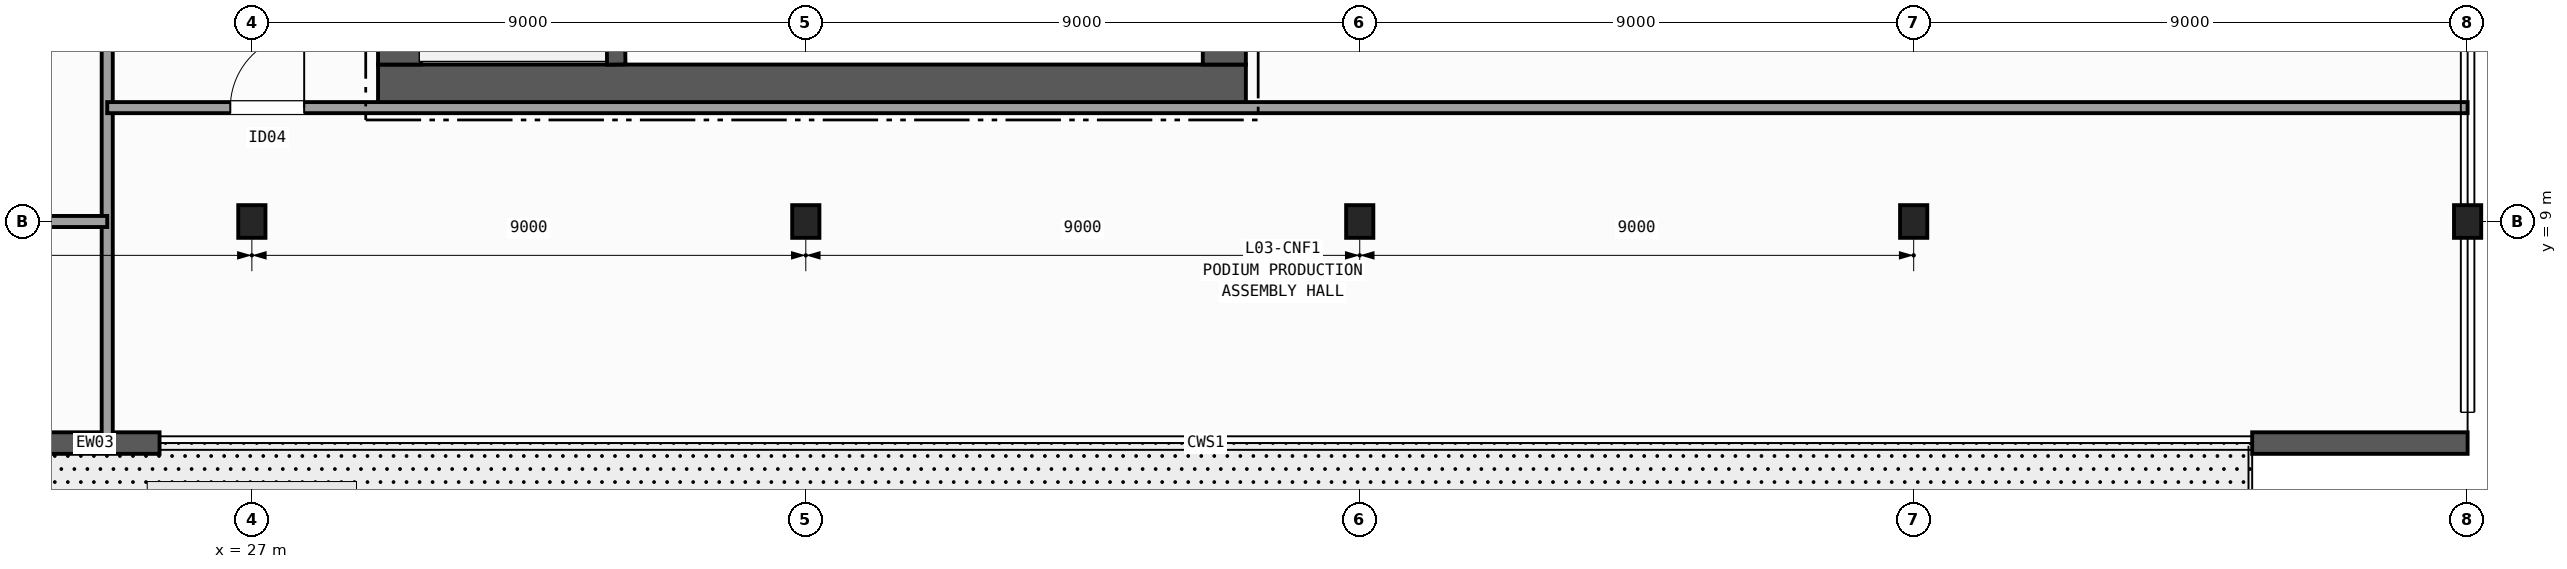
"""IFC4 building model, lengths in metres.
Left out: names, types, materials, properties, quantities, classifications, styles, units other than length and angle.
Written with IfcOpenShell. Run it as: python <this file> out.ifc"""

import sys

from ifc_helpers import new_model, si_unit, direction, frame, frame_2d, origin, origin_2d, place, context, subcontext, project, spatial, rectangle, i_section, extrude, element, fill, save


model = new_model("IFC4")
c1 = context("Model", 3, precision=1e-05, world=origin(), true_north=direction((0.0, 1.0)))
c2 = subcontext(c1, "Body", "Model", "MODEL_VIEW")
j1 = project(units=[si_unit("LENGTHUNIT", "METRE"), si_unit("PLANEANGLEUNIT", "RADIAN")], contexts=[c1])
p1 = place(None, origin())
s1 = spatial("IfcSite", under=j1, at=p1, CompositionType="ELEMENT")
p2 = place(p1, origin())
s2 = spatial("IfcBuilding", under=s1, at=p2, CompositionType="ELEMENT")
p3 = place(p2, frame((0.0, 0.0, 16.2)))
s3 = spatial("IfcBuildingStorey", under=s2, at=p3, CompositionType="ELEMENT", Elevation=16.2)
for number, where, z_axis, x_axis in (
    (1, (27.0, 9.0, 0.0), (0.0, 0.0, 1.0), (1.0, 0.0, 0.0)),
    (2, (36.0, 9.0, 0.0), (0.0, 0.0, 1.0), (1.0, 0.0, 0.0)),
    (3, (45.0, 9.0, 0.0), (0.0, 0.0, 1.0), (1.0, 0.0, 0.0)),
    (4, (54.0, 9.0, 0.0), (0.0, 0.0, 1.0), (1.0, 0.0, 0.0)),
    (5, (63.0, 9.0, 0.0), (0.0, 0.0, 1.0), (1.0, 0.0, 0.0)),
):
    element("IfcColumn", number, at=place(p3, frame(where, z_axis=z_axis, x_axis=x_axis)), inside=s3, PredefinedType="COLUMN", context=c2, shape_type="SweptSolid", body=[
        extrude(i_section(OverallWidth=0.442, OverallDepth=0.531, WebThickness=0.066, FlangeThickness=0.106, FilletRadius=0.015, at=origin_2d()), origin(), (0.0, 0.0, 1.0), 5.0),
    ])
p4 = place(p3, frame((25.5, 5.4, 0.0), z_axis=(0.0, 0.0, 1.0), x_axis=(-1.0, 0.0, 0.0)))
e6 = element("IfcWall", 6, at=p4, inside=s3, PredefinedType="SOLIDWALL", context=c2, shape_type="SweptSolid", body=[
    extrude(rectangle(XDim=5.1, YDim=0.35, at=frame_2d((2.55, 0.0))), origin(), (0.0, 0.0, 1.0), 4.68),
])
p5 = place(p4, frame((2.4, 0.0, 0.0)))
e7 = element("IfcOpeningElement", 7, at=p5, cuts=e6, PredefinedType="OPENING", context=c2, shape_type="SweptSolid", body=[
    extrude(rectangle(XDim=1.2, YDim=2.2, at=frame_2d((0.6, 1.1))), frame((0.0, 0.185, 0.0), z_axis=(0.0, -1.0, 0.0), x_axis=(1.0, 0.0, 0.0)), (0.0, 0.0, 1.0), 0.37),
])
p6 = place(p3, frame((63.0, 5.4, 0.0), z_axis=(0.0, 0.0, 1.0), x_axis=(-1.0, 0.0, 0.0)))
e8 = element("IfcWall", 8, at=p6, inside=s3, PredefinedType="SOLIDWALL", context=c2, shape_type="SweptSolid", body=[
    extrude(rectangle(XDim=3.5, YDim=0.35, at=frame_2d((1.75, 0.0))), origin(), (0.0, 0.0, 1.0), 4.68),
])
p7 = place(p3, frame((29.05, 11.2, 0.0), z_axis=(0.0, 0.0, 1.0), x_axis=(1.0, 0.0, 0.0)))
e9 = element("IfcWall", 9, at=p7, inside=s3, PredefinedType="SHEAR", context=c2, shape_type="SweptSolid", body=[
    extrude(rectangle(XDim=14.1, YDim=0.7, at=frame_2d((7.05, 0.0))), origin(), (0.0, 0.0, 1.0), 4.68),
])
p8 = place(p3, frame((29.4, 24.25, 0.0), z_axis=(0.0, 0.0, 1.0), x_axis=(0.0, -1.0, 0.0)))
e10 = element("IfcWall", 10, at=p8, inside=s3, PredefinedType="SHEAR", context=c2, shape_type="SweptSolid", body=[
    extrude(rectangle(XDim=12.7, YDim=0.7, at=frame_2d((6.35, 0.0))), origin(), (0.0, 0.0, 1.0), 4.68),
])
p9 = place(p8, frame((1.35, 0.0, 0.0)))
e11 = element("IfcOpeningElement", 11, at=p9, cuts=e10, PredefinedType="OPENING", context=c2, shape_type="SweptSolid", body=[
    extrude(rectangle(XDim=1.35, YDim=2.15, at=frame_2d((0.675, 1.075))), frame((0.0, 0.36, 0.0), z_axis=(0.0, -1.0, 0.0), x_axis=(1.0, 0.0, 0.0)), (0.0, 0.0, 1.0), 0.72),
])
p10 = place(p3, frame((42.8, 11.55, 0.0), z_axis=(0.0, 0.0, 1.0), x_axis=(0.0, 1.0, 0.0)))
e12 = element("IfcWall", 12, at=p10, inside=s3, PredefinedType="SHEAR", context=c2, shape_type="SweptSolid", body=[
    extrude(rectangle(XDim=12.7, YDim=0.7, at=frame_2d((6.35, 0.0))), origin(), (0.0, 0.0, 1.0), 4.68),
])
p11 = place(p3, frame((32.92, 11.55, 0.0), z_axis=(0.0, 0.0, 1.0), x_axis=(-0.01331804616, 0.99991131089, 0.0)))
e13 = element("IfcWall", 13, at=p11, inside=s3, PredefinedType="SHEAR", context=c2, shape_type="SweptSolid", body=[
    extrude(rectangle(XDim=9.001, YDim=0.3, at=frame_2d((4.5, 0.0))), origin(), (0.0, 0.0, 1.0), 4.68),
])
p12 = place(p3, frame((24.65, 5.4, 0.0), z_axis=(0.0, 0.0, 1.0), x_axis=(0.0, 1.0, 0.0)))
e14 = element("IfcWall", 14, at=p12, inside=s3, PredefinedType="PARTITIONING", context=c2, shape_type="SweptSolid", body=[
    extrude(rectangle(XDim=22.8, YDim=0.18, at=frame_2d((11.4, 0.0))), origin(), (0.0, 0.0, 1.0), 3.712),
])
p13 = place(p12, frame((8.6, 0.0, 0.0)))
e15 = element("IfcOpeningElement", 15, at=p13, cuts=e14, PredefinedType="OPENING", context=c2, shape_type="SweptSolid", body=[
    extrude(rectangle(XDim=1.4, YDim=2.15, at=frame_2d((0.7, 1.075))), frame((0.0, 0.1, 0.0), z_axis=(0.0, -1.0, 0.0), x_axis=(1.0, 0.0, 0.0)), (0.0, 0.0, 1.0), 0.2),
])
p14 = place(p3, frame((24.65, 10.85, 0.0), z_axis=(0.0, 0.0, 1.0), x_axis=(1.0, 0.0, 0.0)))
e16 = element("IfcWall", 16, at=p14, inside=s3, PredefinedType="PARTITIONING", context=c2, shape_type="SweptSolid", body=[
    extrude(rectangle(XDim=38.35, YDim=0.18, at=frame_2d((19.175, 0.0))), origin(), (0.0, 0.0, 1.0), 3.805),
])
p15 = place(p14, frame((2.0, 0.0, 0.0)))
e17 = element("IfcOpeningElement", 17, at=p15, cuts=e16, PredefinedType="OPENING", context=c2, shape_type="SweptSolid", body=[
    extrude(rectangle(XDim=1.2, YDim=2.15, at=frame_2d((0.6, 1.075))), frame((0.0, 0.1, 0.0), z_axis=(0.0, -1.0, 0.0), x_axis=(1.0, 0.0, 0.0)), (0.0, 0.0, 1.0), 0.2),
])
p16 = place(p3, frame((5.4, 9.0, 0.0), z_axis=(0.0, 0.0, 1.0), x_axis=(1.0, 0.0, 0.0)))
e18 = element("IfcWall", 18, at=p16, inside=s3, PredefinedType="PARTITIONING", context=c2, shape_type="SweptSolid", body=[
    extrude(rectangle(XDim=19.25, YDim=0.18, at=frame_2d((9.625, 0.0))), origin(), (0.0, 0.0, 1.0), 3.733),
])
p17 = place(p16, frame((8.1, 0.0, 0.0)))
e19 = element("IfcOpeningElement", 19, at=p17, cuts=e18, PredefinedType="OPENING", context=c2, shape_type="SweptSolid", body=[
    extrude(rectangle(XDim=1.2, YDim=2.15, at=frame_2d((0.6, 1.075))), frame((0.0, 0.1, 0.0), z_axis=(0.0, -1.0, 0.0), x_axis=(1.0, 0.0, 0.0)), (0.0, 0.0, 1.0), 0.2),
])
p18 = place(p15, origin())
e20 = element("IfcDoor", 20, at=p18, inside=s3, OperationType="SINGLE_SWING_RIGHT", PredefinedType="DOOR", context=c2, shape_type="SweptSolid", body=[
    extrude(rectangle(XDim=1.2, YDim=2.15, at=frame_2d((0.6, 1.075))), frame((0.0, 0.025, 0.0), z_axis=(0.0, -1.0, 0.0), x_axis=(1.0, 0.0, 0.0)), (0.0, 0.0, 1.0), 0.05),
])
fill(e17, e20)
save(model, sys.argv[1])
